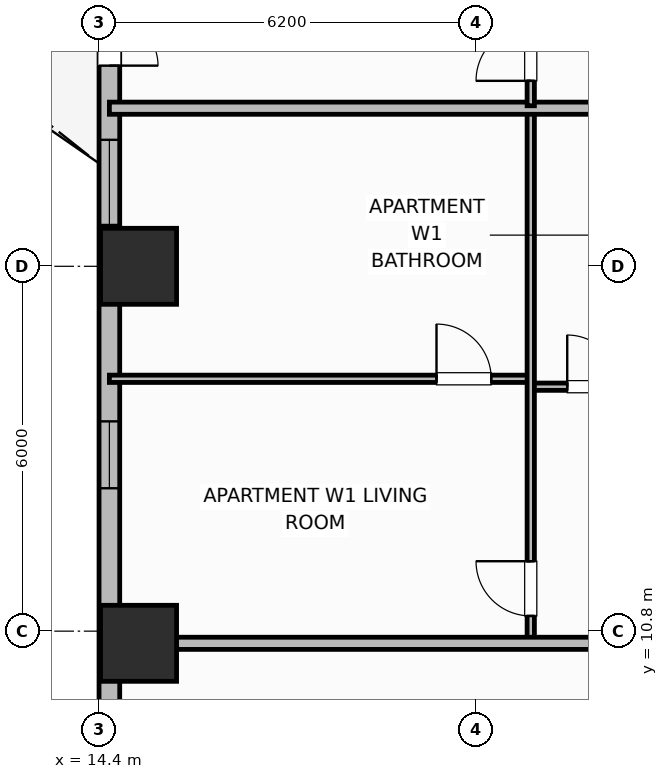
"""IFC4 building model, lengths in metres.
Left out: names, types, materials, properties, quantities, classifications, styles, units other than length and angle.
Written with IfcOpenShell. Run it as: python <this file> out.ifc"""

import sys

from ifc_helpers import new_model, si_unit, direction, frame, frame_2d, origin, origin_2d, place, context, subcontext, project, spatial, rectangle, extrude, element, fill, save


model = new_model("IFC4")
c1 = context("Model", 3, precision=1e-05, world=origin(), true_north=direction((0.0, 1.0)))
c2 = subcontext(c1, "Body", "Model", "MODEL_VIEW")
j1 = project(units=[si_unit("LENGTHUNIT", "METRE"), si_unit("PLANEANGLEUNIT", "RADIAN")], contexts=[c1])
p1 = place(None, origin())
s1 = spatial("IfcSite", under=j1, at=p1, CompositionType="ELEMENT")
p2 = place(p1, origin())
s2 = spatial("IfcBuilding", under=s1, at=p2, CompositionType="ELEMENT")
p3 = place(p2, frame((0.0, 0.0, 54.7)))
s3 = spatial("IfcBuildingStorey", under=s2, at=p3, CompositionType="ELEMENT", Elevation=54.7)
for number, where, z_axis, x_axis in (
    (1, (15.05, 10.6, 0.0), (0.0, 0.0, 1.0), (1.0, 0.0, 0.0)),
    (2, (15.05, 16.8, 0.0), (0.0, 0.0, 1.0), (1.0, 0.0, 0.0)),
):
    element("IfcColumn", number, at=place(p3, frame(where, z_axis=z_axis, x_axis=x_axis)), inside=s3, PredefinedType="COLUMN", context=c2, shape_type="SweptSolid", body=[
        extrude(rectangle(XDim=1.25, YDim=1.25, at=origin_2d()), origin(), (0.0, 0.0, 1.0), 3.7),
    ])
p4 = place(p3, frame((14.57, 23.8, 0.0), z_axis=(0.0, 0.0, 1.0), x_axis=(0.0, -1.0, 0.0)))
e3 = element("IfcWall", 3, at=p4, inside=s3, PredefinedType="SOLIDWALL", context=c2, shape_type="SweptSolid", body=[
    extrude(rectangle(XDim=14.8, YDim=0.34, at=frame_2d((7.4, 0.0))), origin(), (0.0, 0.0, 1.0), 2.7),
])
p5 = place(p4, frame((2.1, 0.0, 0.0)))
e4 = element("IfcOpeningElement", 4, at=p5, cuts=e3, PredefinedType="OPENING", context=c2, shape_type="SweptSolid", body=[
    extrude(rectangle(XDim=1.6, YDim=2.1, at=frame_2d((0.8, 1.05))), frame((0.0, 0.18, 0.0), z_axis=(0.0, -1.0, 0.0), x_axis=(1.0, 0.0, 0.0)), (0.0, 0.0, 1.0), 0.36),
])
p6 = place(p4, frame((4.92, 0.0, 0.69)))
e5 = element("IfcOpeningElement", 5, at=p6, cuts=e3, PredefinedType="OPENING", context=c2, shape_type="SweptSolid", body=[
    extrude(rectangle(XDim=1.4, YDim=1.85, at=frame_2d((0.7, 0.925))), frame((0.0, 0.18, 0.0), z_axis=(0.0, -1.0, 0.0), x_axis=(1.0, 0.0, 0.0)), (0.0, 0.0, 1.0), 0.36),
])
p7 = place(p4, frame((9.55, 0.0, 0.93)))
e6 = element("IfcOpeningElement", 6, at=p7, cuts=e3, PredefinedType="OPENING", context=c2, shape_type="SweptSolid", body=[
    extrude(rectangle(XDim=1.1, YDim=1.65, at=frame_2d((0.55, 0.825))), frame((0.0, 0.18, 0.0), z_axis=(0.0, -1.0, 0.0), x_axis=(1.0, 0.0, 0.0)), (0.0, 0.0, 1.0), 0.36),
])
p8 = place(p3, frame((21.5, 14.82, 0.0), z_axis=(0.0, 0.0, 1.0), x_axis=(1.0, 0.0, 0.0)))
e7 = element("IfcWall", 7, at=p8, inside=s3, PredefinedType="PARTITIONING", context=c2, shape_type="SweptSolid", body=[
    extrude(rectangle(XDim=2.25, YDim=0.12, at=frame_2d((1.125, 0.0))), origin(), (0.0, 0.0, 1.0), 2.53),
])
p9 = place(p8, frame((0.6, 0.0, 0.0)))
e8 = element("IfcOpeningElement", 8, at=p9, cuts=e7, PredefinedType="OPENING", context=c2, shape_type="SweptSolid", body=[
    extrude(rectangle(XDim=0.85, YDim=2.1, at=frame_2d((0.425, 1.05))), frame((0.0, 0.07, 0.0), z_axis=(0.0, -1.0, 0.0), x_axis=(1.0, 0.0, 0.0)), (0.0, 0.0, 1.0), 0.14),
])
p10 = place(p3, frame((14.57, 14.95, 0.0), z_axis=(0.0, 0.0, 1.0), x_axis=(1.0, 0.0, 0.0)))
e9 = element("IfcWall", 9, at=p10, inside=s3, PredefinedType="PARTITIONING", context=c2, shape_type="SweptSolid", body=[
    extrude(rectangle(XDim=6.93, YDim=0.12, at=frame_2d((3.465, 0.0))), origin(), (0.0, 0.0, 1.0), 2.53),
])
p11 = place(p10, frame((5.38, 0.0, 0.0)))
e10 = element("IfcOpeningElement", 10, at=p11, cuts=e9, PredefinedType="OPENING", context=c2, shape_type="SweptSolid", body=[
    extrude(rectangle(XDim=0.9, YDim=2.1, at=frame_2d((0.45, 1.05))), frame((0.0, 0.07, 0.0), z_axis=(0.0, -1.0, 0.0), x_axis=(1.0, 0.0, 0.0)), (0.0, 0.0, 1.0), 0.14),
])
p12 = place(p3, frame((21.5, 10.64, 0.0), z_axis=(0.0, 0.0, 1.0), x_axis=(0.0, 1.0, 0.0)))
e11 = element("IfcWall", 11, at=p12, inside=s3, PredefinedType="PARTITIONING", context=c2, shape_type="SweptSolid", body=[
    extrude(rectangle(XDim=8.72, YDim=0.12, at=frame_2d((4.36, 0.0))), origin(), (0.0, 0.0, 1.0), 2.53),
])
p13 = place(p12, frame((0.41, 0.0, 0.0)))
e12 = element("IfcOpeningElement", 12, at=p13, cuts=e11, PredefinedType="OPENING", context=c2, shape_type="SweptSolid", body=[
    extrude(rectangle(XDim=0.9, YDim=2.1, at=frame_2d((0.45, 1.05))), frame((0.0, 0.07, 0.0), z_axis=(0.0, -1.0, 0.0), x_axis=(1.0, 0.0, 0.0)), (0.0, 0.0, 1.0), 0.14),
])
p14 = place(p3, frame((14.57, 19.4, 0.0), z_axis=(0.0, 0.0, 1.0), x_axis=(1.0, 0.0, 0.0)))
e13 = element("IfcWall", 13, at=p14, inside=s3, PredefinedType="PARTITIONING", context=c2, shape_type="SweptSolid", body=[
    extrude(rectangle(XDim=9.18, YDim=0.2, at=frame_2d((4.59, 0.0))), origin(), (0.0, 0.0, 1.0), 2.53),
])
p15 = place(p3, frame((21.5, 19.44, 0.0), z_axis=(0.0, 0.0, 1.0), x_axis=(0.0, 1.0, 0.0)))
e14 = element("IfcWall", 14, at=p15, inside=s3, PredefinedType="PARTITIONING", context=c2, shape_type="SweptSolid", body=[
    extrude(rectangle(XDim=7.12, YDim=0.12, at=frame_2d((3.56, 0.0))), origin(), (0.0, 0.0, 1.0), 2.53),
])
p16 = place(p15, frame((0.41, 0.0, 0.0)))
e15 = element("IfcOpeningElement", 15, at=p16, cuts=e14, PredefinedType="OPENING", context=c2, shape_type="SweptSolid", body=[
    extrude(rectangle(XDim=0.9, YDim=2.1, at=frame_2d((0.45, 1.05))), frame((0.0, 0.07, 0.0), z_axis=(0.0, -1.0, 0.0), x_axis=(1.0, 0.0, 0.0)), (0.0, 0.0, 1.0), 0.14),
])
p17 = place(p3, frame((14.99, 10.6, 0.0), z_axis=(0.0, 0.0, 1.0), x_axis=(1.0, 0.0, 0.0)))
e16 = element("IfcWall", 16, at=p17, inside=s3, PredefinedType="PARTITIONING", context=c2, shape_type="SweptSolid", body=[
    extrude(rectangle(XDim=8.76, YDim=0.2, at=frame_2d((4.38, 0.0))), origin(), (0.0, 0.0, 1.0), 2.53),
])
p18 = place(p5, origin())
e17 = element("IfcDoor", 17, at=p18, inside=s3, OperationType="DOUBLE_DOOR_SINGLE_SWING", PredefinedType="DOOR", context=c2, shape_type="SweptSolid", body=[
    extrude(rectangle(XDim=1.6, YDim=2.1, at=frame_2d((0.8, 1.05))), frame((0.0, 0.025, 0.0), z_axis=(0.0, -1.0, 0.0), x_axis=(1.0, 0.0, 0.0)), (0.0, 0.0, 1.0), 0.05),
])
fill(e4, e17)
p19 = place(p6, origin())
e18 = element("IfcWindow", 18, at=p19, inside=s3, PartitioningType="SINGLE_PANEL", PredefinedType="WINDOW", context=c2, shape_type="SweptSolid", body=[
    extrude(rectangle(XDim=1.4, YDim=1.85, at=frame_2d((0.7, 0.925))), frame((0.0, 0.03, 0.0), z_axis=(0.0, -1.0, 0.0), x_axis=(1.0, 0.0, 0.0)), (0.0, 0.0, 1.0), 0.06),
])
fill(e5, e18)
p20 = place(p7, origin())
e19 = element("IfcWindow", 19, at=p20, inside=s3, PartitioningType="SINGLE_PANEL", PredefinedType="WINDOW", context=c2, shape_type="SweptSolid", body=[
    extrude(rectangle(XDim=1.1, YDim=1.65, at=frame_2d((0.55, 0.825))), frame((0.0, 0.03, 0.0), z_axis=(0.0, -1.0, 0.0), x_axis=(1.0, 0.0, 0.0)), (0.0, 0.0, 1.0), 0.06),
])
fill(e6, e19)
p21 = place(p9, origin())
e20 = element("IfcDoor", 20, at=p21, inside=s3, OperationType="SINGLE_SWING_LEFT", PredefinedType="DOOR", context=c2, shape_type="SweptSolid", body=[
    extrude(rectangle(XDim=0.85, YDim=2.1, at=frame_2d((0.425, 1.05))), frame((0.0, 0.025, 0.0), z_axis=(0.0, -1.0, 0.0), x_axis=(1.0, 0.0, 0.0)), (0.0, 0.0, 1.0), 0.05),
])
fill(e8, e20)
p22 = place(p11, origin())
e21 = element("IfcDoor", 21, at=p22, inside=s3, OperationType="SINGLE_SWING_LEFT", PredefinedType="DOOR", context=c2, shape_type="SweptSolid", body=[
    extrude(rectangle(XDim=0.9, YDim=2.1, at=frame_2d((0.45, 1.05))), frame((0.0, 0.025, 0.0), z_axis=(0.0, -1.0, 0.0), x_axis=(1.0, 0.0, 0.0)), (0.0, 0.0, 1.0), 0.05),
])
fill(e10, e21)
p23 = place(p13, origin())
e22 = element("IfcDoor", 22, at=p23, inside=s3, OperationType="SINGLE_SWING_RIGHT", PredefinedType="DOOR", context=c2, shape_type="SweptSolid", body=[
    extrude(rectangle(XDim=0.9, YDim=2.1, at=frame_2d((0.45, 1.05))), frame((0.0, 0.025, 0.0), z_axis=(0.0, -1.0, 0.0), x_axis=(1.0, 0.0, 0.0)), (0.0, 0.0, 1.0), 0.05),
])
fill(e12, e22)
p24 = place(p16, origin())
e23 = element("IfcDoor", 23, at=p24, inside=s3, OperationType="SINGLE_SWING_LEFT", PredefinedType="DOOR", context=c2, shape_type="SweptSolid", body=[
    extrude(rectangle(XDim=0.9, YDim=2.1, at=frame_2d((0.45, 1.05))), frame((0.0, 0.025, 0.0), z_axis=(0.0, -1.0, 0.0), x_axis=(1.0, 0.0, 0.0)), (0.0, 0.0, 1.0), 0.05),
])
fill(e15, e23)
save(model, sys.argv[1])
